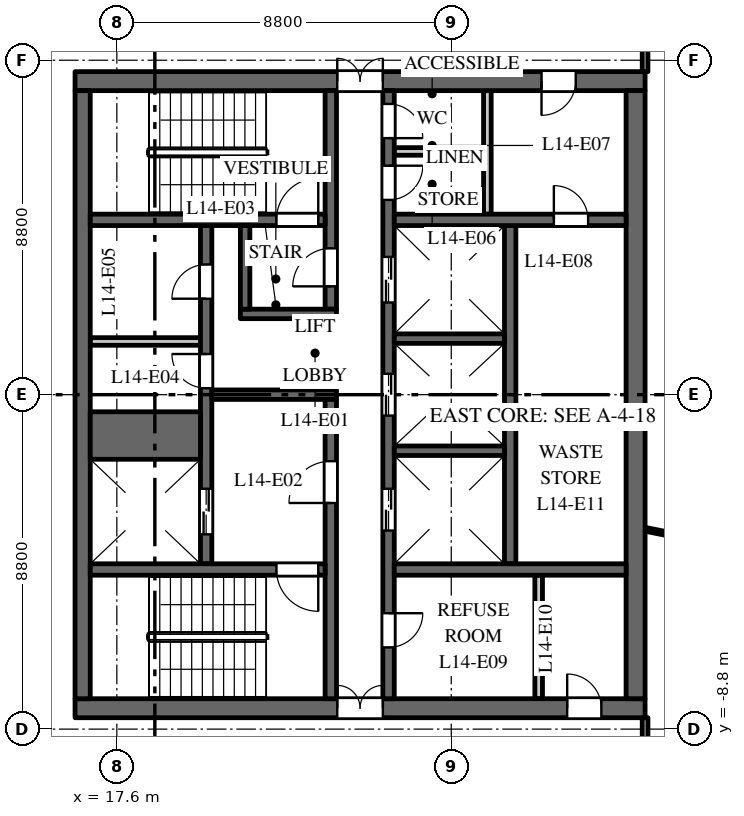
"""IFC4 building model, lengths in metres.
Left out: names, types, materials, properties, quantities, classifications, styles, units other than length and angle.
Written with IfcOpenShell. Run it as: python <this file> out.ifc"""

import sys

from ifc_helpers import new_model, si_unit, direction, frame, frame_2d, origin, place, context, subcontext, project, spatial, rectangle, extrude, element, fill, save


model = new_model("IFC4")
c1 = context("Model", 3, precision=1e-05, world=origin(), true_north=direction((0.0, 1.0)))
c2 = subcontext(c1, "Body", "Model", "MODEL_VIEW")
j1 = project(units=[si_unit("LENGTHUNIT", "METRE"), si_unit("PLANEANGLEUNIT", "RADIAN")], contexts=[c1])
p1 = place(None, origin())
s1 = spatial("IfcSite", under=j1, at=p1, CompositionType="ELEMENT")
p2 = place(p1, origin())
s2 = spatial("IfcBuilding", under=s1, at=p2, CompositionType="ELEMENT")
p3 = place(p2, frame((0.0, 0.0, 66.5)))
s3 = spatial("IfcBuildingStorey", under=s2, at=p3, CompositionType="ELEMENT", Elevation=66.5)
p4 = place(p3, frame((16.5, 8.25, 0.0), z_axis=(0.0, 0.0, 1.0), x_axis=(1.0, 0.0, 0.0)))
e1 = element("IfcWall", 1, at=p4, inside=s3, PredefinedType="SHEAR", context=c2, shape_type="SweptSolid", body=[
    extrude(rectangle(XDim=15.0, YDim=0.5, at=frame_2d((7.5, 0.0))), origin(), (0.0, 0.0, 1.0), 3.7),
])
p5 = place(p4, frame((6.9, 0.0, 0.0)))
e2 = element("IfcOpeningElement", 2, at=p5, cuts=e1, PredefinedType="OPENING", context=c2, shape_type="SweptSolid", body=[
    extrude(rectangle(XDim=1.2, YDim=2.1, at=frame_2d((0.6, 1.05))), frame((0.0, 0.26, 0.0), z_axis=(0.0, -1.0, 0.0), x_axis=(1.0, 0.0, 0.0)), (0.0, 0.0, 1.0), 0.52),
])
p6 = place(p4, frame((12.275, 0.0, 0.0)))
e3 = element("IfcOpeningElement", 3, at=p6, cuts=e1, PredefinedType="OPENING", context=c2, shape_type="SweptSolid", body=[
    extrude(rectangle(XDim=0.9, YDim=2.1, at=frame_2d((0.45, 1.05))), frame((0.0, 0.26, 0.0), z_axis=(0.0, -1.0, 0.0), x_axis=(1.0, 0.0, 0.0)), (0.0, 0.0, 1.0), 0.52),
])
p7 = place(p3, frame((16.5, -8.25, 0.0), z_axis=(0.0, 0.0, 1.0), x_axis=(1.0, 0.0, 0.0)))
e4 = element("IfcWall", 4, at=p7, inside=s3, PredefinedType="SHEAR", context=c2, shape_type="SweptSolid", body=[
    extrude(rectangle(XDim=15.0, YDim=0.5, at=frame_2d((7.5, 0.0))), origin(), (0.0, 0.0, 1.0), 3.7),
])
p8 = place(p7, frame((6.9, 0.0, 0.0)))
e5 = element("IfcOpeningElement", 5, at=p8, cuts=e4, PredefinedType="OPENING", context=c2, shape_type="SweptSolid", body=[
    extrude(rectangle(XDim=1.2, YDim=2.1, at=frame_2d((0.6, 1.05))), frame((0.0, 0.26, 0.0), z_axis=(0.0, -1.0, 0.0), x_axis=(1.0, 0.0, 0.0)), (0.0, 0.0, 1.0), 0.52),
])
p9 = place(p7, frame((12.95, 0.0, 0.0)))
e6 = element("IfcOpeningElement", 6, at=p9, cuts=e4, PredefinedType="OPENING", context=c2, shape_type="SweptSolid", body=[
    extrude(rectangle(XDim=0.9, YDim=2.1, at=frame_2d((0.45, 1.05))), frame((0.0, 0.26, 0.0), z_axis=(0.0, -1.0, 0.0), x_axis=(1.0, 0.0, 0.0)), (0.0, 0.0, 1.0), 0.52),
])
p10 = place(p3, frame((16.9, 1.4, 0.0), z_axis=(0.0, 0.0, 1.0), x_axis=(1.0, 0.0, 0.0)))
e7 = element("IfcWall", 7, at=p10, inside=s3, PredefinedType="PARTITIONING", context=c2, shape_type="SweptSolid", body=[
    extrude(rectangle(XDim=2.9, YDim=0.2, at=frame_2d((1.45, 0.0))), origin(), (0.0, 0.0, 1.0), 3.7),
])
p11 = place(p3, frame((27.95, -4.45, 0.0), z_axis=(0.0, 0.0, 1.0), x_axis=(0.0, 1.0, 0.0)))
e8 = element("IfcWall", 8, at=p11, inside=s3, PredefinedType="SHEAR", context=c2, shape_type="SweptSolid", body=[
    extrude(rectangle(XDim=8.9, YDim=0.3, at=frame_2d((4.45, 0.0))), origin(), (0.0, 0.0, 1.0), 3.7),
])
p12 = place(p3, frame((19.95, -4.45, 0.0), z_axis=(0.0, 0.0, 1.0), x_axis=(0.0, 1.0, 0.0)))
e9 = element("IfcWall", 9, at=p12, inside=s3, PredefinedType="SHEAR", context=c2, shape_type="SweptSolid", body=[
    extrude(rectangle(XDim=8.9, YDim=0.3, at=frame_2d((4.45, 0.0))), origin(), (0.0, 0.0, 1.0), 3.7),
])
p13 = place(p12, frame((0.775, 0.0, 0.0)))
e10 = element("IfcOpeningElement", 10, at=p13, cuts=e9, PredefinedType="OPENING", context=c2, shape_type="SweptSolid", body=[
    extrude(rectangle(XDim=1.2, YDim=2.1, at=frame_2d((0.6, 1.05))), frame((0.0, 0.16, 0.0), z_axis=(0.0, -1.0, 0.0), x_axis=(1.0, 0.0, 0.0)), (0.0, 0.0, 1.0), 0.32),
])
p14 = place(p12, frame((4.62, 0.0, 0.0)))
e11 = element("IfcOpeningElement", 11, at=p14, cuts=e9, PredefinedType="OPENING", context=c2, shape_type="SweptSolid", body=[
    extrude(rectangle(XDim=0.9, YDim=2.1, at=frame_2d((0.45, 1.05))), frame((0.0, 0.16, 0.0), z_axis=(0.0, -1.0, 0.0), x_axis=(1.0, 0.0, 0.0)), (0.0, 0.0, 1.0), 0.32),
])
p15 = place(p12, frame((6.975, 0.0, 0.0)))
e12 = element("IfcOpeningElement", 12, at=p15, cuts=e9, PredefinedType="OPENING", context=c2, shape_type="SweptSolid", body=[
    extrude(rectangle(XDim=0.9, YDim=2.1, at=frame_2d((0.45, 1.05))), frame((0.0, 0.16, 0.0), z_axis=(0.0, -1.0, 0.0), x_axis=(1.0, 0.0, 0.0)), (0.0, 0.0, 1.0), 0.32),
])
p16 = place(p3, frame((24.75, -8.0, 0.0), z_axis=(0.0, 0.0, 1.0), x_axis=(0.0, 1.0, 0.0)))
e13 = element("IfcWall", 13, at=p16, inside=s3, PredefinedType="SHEAR", context=c2, shape_type="SweptSolid", body=[
    extrude(rectangle(XDim=16.0, YDim=0.3, at=frame_2d((8.0, 0.0))), origin(), (0.0, 0.0, 1.0), 3.7),
])
p17 = place(p16, frame((4.425, 0.0, 0.0)))
e14 = element("IfcOpeningElement", 14, at=p17, cuts=e13, PredefinedType="OPENING", context=c2, shape_type="SweptSolid", body=[
    extrude(rectangle(XDim=1.1, YDim=2.1, at=frame_2d((0.55, 1.05))), frame((0.0, 0.16, 0.0), z_axis=(0.0, -1.0, 0.0), x_axis=(1.0, 0.0, 0.0)), (0.0, 0.0, 1.0), 0.32),
])
p18 = place(p16, frame((7.45, 0.0, 0.0)))
e15 = element("IfcOpeningElement", 15, at=p18, cuts=e13, PredefinedType="OPENING", context=c2, shape_type="SweptSolid", body=[
    extrude(rectangle(XDim=1.1, YDim=2.1, at=frame_2d((0.55, 1.05))), frame((0.0, 0.16, 0.0), z_axis=(0.0, -1.0, 0.0), x_axis=(1.0, 0.0, 0.0)), (0.0, 0.0, 1.0), 0.32),
])
p19 = place(p16, frame((10.425, 0.0, 0.0)))
e16 = element("IfcOpeningElement", 16, at=p19, cuts=e13, PredefinedType="OPENING", context=c2, shape_type="SweptSolid", body=[
    extrude(rectangle(XDim=1.2, YDim=2.1, at=frame_2d((0.6, 1.05))), frame((0.0, 0.16, 0.0), z_axis=(0.0, -1.0, 0.0), x_axis=(1.0, 0.0, 0.0)), (0.0, 0.0, 1.0), 0.32),
])
p20 = place(p16, frame((13.125, 0.0, 0.0)))
e17 = element("IfcOpeningElement", 17, at=p20, cuts=e13, PredefinedType="OPENING", context=c2, shape_type="SweptSolid", body=[
    extrude(rectangle(XDim=0.9, YDim=2.1, at=frame_2d((0.45, 1.05))), frame((0.0, 0.16, 0.0), z_axis=(0.0, -1.0, 0.0), x_axis=(1.0, 0.0, 0.0)), (0.0, 0.0, 1.0), 0.32),
])
p21 = place(p16, frame((14.75, 0.0, 0.0)))
e18 = element("IfcOpeningElement", 18, at=p21, cuts=e13, PredefinedType="OPENING", context=c2, shape_type="SweptSolid", body=[
    extrude(rectangle(XDim=0.9, YDim=2.1, at=frame_2d((0.45, 1.05))), frame((0.0, 0.16, 0.0), z_axis=(0.0, -1.0, 0.0), x_axis=(1.0, 0.0, 0.0)), (0.0, 0.0, 1.0), 0.32),
])
p22 = place(p16, frame((1.35, 0.0, 0.0)))
e19 = element("IfcOpeningElement", 19, at=p22, cuts=e13, PredefinedType="OPENING", context=c2, shape_type="SweptSolid", body=[
    extrude(rectangle(XDim=0.9, YDim=2.1, at=frame_2d((0.45, 1.05))), frame((0.0, 0.16, 0.0), z_axis=(0.0, -1.0, 0.0), x_axis=(1.0, 0.0, 0.0)), (0.0, 0.0, 1.0), 0.32),
])
p23 = place(p3, frame((20.1, 0.0, 0.0), z_axis=(0.0, 0.0, 1.0), x_axis=(1.0, 0.0, 0.0)))
e20 = element("IfcWall", 20, at=p23, inside=s3, PredefinedType="SHEAR", context=c2, shape_type="SweptSolid", body=[
    extrude(rectangle(XDim=3.28, YDim=0.25, at=frame_2d((1.64, 0.0))), origin(), (0.0, 0.0, 1.0), 3.7),
])
p24 = place(p3, frame((16.7, -8.0, 0.0), z_axis=(0.0, 0.0, 1.0), x_axis=(0.0, 1.0, 0.0)))
e21 = element("IfcWall", 21, at=p24, inside=s3, PredefinedType="SHEAR", context=c2, shape_type="SweptSolid", body=[
    extrude(rectangle(XDim=16.0, YDim=0.4, at=frame_2d((8.0, 0.0))), origin(), (0.0, 0.0, 1.0), 3.7),
])
p25 = place(p3, frame((31.25, -8.0, 0.0), z_axis=(0.0, 0.0, 1.0), x_axis=(0.0, 1.0, 0.0)))
e22 = element("IfcWall", 22, at=p25, inside=s3, PredefinedType="SHEAR", context=c2, shape_type="SweptSolid", body=[
    extrude(rectangle(XDim=16.0, YDim=0.5, at=frame_2d((8.0, 0.0))), origin(), (0.0, 0.0, 1.0), 3.7),
])
p26 = place(p3, frame((24.9, 4.6, 0.0), z_axis=(0.0, 0.0, 1.0), x_axis=(1.0, 0.0, 0.0)))
e23 = element("IfcWall", 23, at=p26, inside=s3, PredefinedType="SHEAR", context=c2, shape_type="SweptSolid", body=[
    extrude(rectangle(XDim=6.1, YDim=0.3, at=frame_2d((3.05, 0.0))), origin(), (0.0, 0.0, 1.0), 3.7),
])
p27 = place(p26, frame((4.2, 0.0, 0.0)))
e24 = element("IfcOpeningElement", 24, at=p27, cuts=e23, PredefinedType="OPENING", context=c2, shape_type="SweptSolid", body=[
    extrude(rectangle(XDim=0.9, YDim=2.1, at=frame_2d((0.45, 1.05))), frame((0.0, 0.16, 0.0), z_axis=(0.0, -1.0, 0.0), x_axis=(1.0, 0.0, 0.0)), (0.0, 0.0, 1.0), 0.32),
])
for number, where, z_axis, x_axis in (
    (25, (27.35, 4.75, 0.0), (0.0, 0.0, 1.0), (0.0, 1.0, 0.0)),
    (26, (28.7, -8.0, 0.0), (0.0, 0.0, 1.0), (0.0, 1.0, 0.0)),
):
    element("IfcWall", number, at=place(p3, frame(where, z_axis=z_axis, x_axis=x_axis)), inside=s3, PredefinedType="PARTITIONING", context=c2, shape_type="SweptSolid", body=[
        extrude(rectangle(XDim=3.25, YDim=0.2, at=frame_2d((1.625, 0.0))), origin(), (0.0, 0.0, 1.0), 3.7),
    ])
p28 = place(p3, frame((24.9, 6.4, 0.0), z_axis=(0.0, 0.0, 1.0), x_axis=(1.0, 0.0, 0.0)))
e27 = element("IfcWall", 27, at=p28, inside=s3, PredefinedType="PARTITIONING", context=c2, shape_type="SweptSolid", body=[
    extrude(rectangle(XDim=2.35, YDim=0.2, at=frame_2d((1.175, 0.0))), origin(), (0.0, 0.0, 1.0), 3.7),
])
p29 = place(p3, frame((24.9, -4.6, 0.0), z_axis=(0.0, 0.0, 1.0), x_axis=(1.0, 0.0, 0.0)))
e28 = element("IfcWall", 28, at=p29, inside=s3, PredefinedType="SHEAR", context=c2, shape_type="SweptSolid", body=[
    extrude(rectangle(XDim=6.1, YDim=0.3, at=frame_2d((3.05, 0.0))), origin(), (0.0, 0.0, 1.0), 3.7),
])
p30 = place(p3, frame((16.9, -1.075, 0.0), z_axis=(0.0, 0.0, 1.0), x_axis=(1.0, 0.0, 0.0)))
e29 = element("IfcWall", 29, at=p30, inside=s3, PredefinedType="SHEAR", context=c2, shape_type="SweptSolid", body=[
    extrude(rectangle(XDim=2.9, YDim=1.25, at=frame_2d((1.45, 0.0))), origin(), (0.0, 0.0, 1.0), 3.7),
])
for number, where, z_axis, x_axis in (
    (30, (24.9, -1.475, 0.0), (0.0, 0.0, 1.0), (1.0, 0.0, 0.0)),
    (31, (24.9, 1.475, 0.0), (0.0, 0.0, 1.0), (1.0, 0.0, 0.0)),
):
    element("IfcWall", number, at=place(p3, frame(where, z_axis=z_axis, x_axis=x_axis)), inside=s3, PredefinedType="SHEAR", context=c2, shape_type="SweptSolid", body=[
        extrude(rectangle(XDim=2.9, YDim=0.25, at=frame_2d((1.45, 0.0))), origin(), (0.0, 0.0, 1.0), 3.7),
    ])
p31 = place(p3, frame((23.23, 2.25, 0.0), z_axis=(0.0, 0.0, 1.0), x_axis=(0.0, 1.0, 0.0)))
e32 = element("IfcWall", 32, at=p31, inside=s3, PredefinedType="SHEAR", context=c2, shape_type="SweptSolid", body=[
    extrude(rectangle(XDim=5.75, YDim=0.3, at=frame_2d((2.875, 0.0))), origin(), (0.0, 0.0, 1.0), 3.7),
])
p32 = place(p31, frame((0.6, 0.0, 0.0)))
e33 = element("IfcOpeningElement", 33, at=p32, cuts=e32, PredefinedType="OPENING", context=c2, shape_type="SweptSolid", body=[
    extrude(rectangle(XDim=1.0, YDim=2.1, at=frame_2d((0.5, 1.05))), frame((0.0, 0.16, 0.0), z_axis=(0.0, -1.0, 0.0), x_axis=(1.0, 0.0, 0.0)), (0.0, 0.0, 1.0), 0.32),
])
p33 = place(p3, frame((23.23, -8.0, 0.0), z_axis=(0.0, 0.0, 1.0), x_axis=(0.0, 1.0, 0.0)))
e34 = element("IfcWall", 34, at=p33, inside=s3, PredefinedType="SHEAR", context=c2, shape_type="SweptSolid", body=[
    extrude(rectangle(XDim=7.875, YDim=0.3, at=frame_2d((3.938, 0.0))), origin(), (0.0, 0.0, 1.0), 3.7),
])
p34 = place(p33, frame((5.15, 0.0, 0.0)))
e35 = element("IfcOpeningElement", 35, at=p34, cuts=e34, PredefinedType="OPENING", context=c2, shape_type="SweptSolid", body=[
    extrude(rectangle(XDim=1.1, YDim=2.1, at=frame_2d((0.55, 1.05))), frame((0.0, 0.16, 0.0), z_axis=(0.0, -1.0, 0.0), x_axis=(1.0, 0.0, 0.0)), (0.0, 0.0, 1.0), 0.32),
])
p35 = place(p3, frame((16.9, 4.6, 0.0), z_axis=(0.0, 0.0, 1.0), x_axis=(1.0, 0.0, 0.0)))
e36 = element("IfcWall", 36, at=p35, inside=s3, PredefinedType="SHEAR", context=c2, shape_type="SweptSolid", body=[
    extrude(rectangle(XDim=6.18, YDim=0.3, at=frame_2d((3.09, 0.0))), origin(), (0.0, 0.0, 1.0), 3.7),
])
p36 = place(p35, frame((4.9, 0.0, 0.0)))
e37 = element("IfcOpeningElement", 37, at=p36, cuts=e36, PredefinedType="OPENING", context=c2, shape_type="SweptSolid", body=[
    extrude(rectangle(XDim=1.1, YDim=2.1, at=frame_2d((0.55, 1.05))), frame((0.0, 0.16, 0.0), z_axis=(0.0, -1.0, 0.0), x_axis=(1.0, 0.0, 0.0)), (0.0, 0.0, 1.0), 0.32),
])
p37 = place(p3, frame((16.9, -4.6, 0.0), z_axis=(0.0, 0.0, 1.0), x_axis=(1.0, 0.0, 0.0)))
e38 = element("IfcWall", 38, at=p37, inside=s3, PredefinedType="SHEAR", context=c2, shape_type="SweptSolid", body=[
    extrude(rectangle(XDim=6.18, YDim=0.3, at=frame_2d((3.09, 0.0))), origin(), (0.0, 0.0, 1.0), 3.7),
])
p38 = place(p37, frame((4.9, 0.0, 0.0)))
e39 = element("IfcOpeningElement", 39, at=p38, cuts=e38, PredefinedType="OPENING", context=c2, shape_type="SweptSolid", body=[
    extrude(rectangle(XDim=1.1, YDim=2.1, at=frame_2d((0.55, 1.05))), frame((0.0, 0.16, 0.0), z_axis=(0.0, -1.0, 0.0), x_axis=(1.0, 0.0, 0.0)), (0.0, 0.0, 1.0), 0.32),
])
p39 = place(p3, frame((20.85, 2.125, 0.0), z_axis=(0.0, 0.0, 1.0), x_axis=(1.0, 0.0, 0.0)))
e40 = element("IfcWall", 40, at=p39, inside=s3, PredefinedType="SHEAR", context=c2, shape_type="SweptSolid", body=[
    extrude(rectangle(XDim=2.53, YDim=0.25, at=frame_2d((1.265, 0.0))), origin(), (0.0, 0.0, 1.0), 3.7),
])
p40 = place(p3, frame((20.975, 2.25, 0.0), z_axis=(0.0, 0.0, 1.0), x_axis=(0.0, 1.0, 0.0)))
e41 = element("IfcWall", 41, at=p40, inside=s3, PredefinedType="SHEAR", context=c2, shape_type="SweptSolid", body=[
    extrude(rectangle(XDim=2.2, YDim=0.25, at=frame_2d((1.1, 0.0))), origin(), (0.0, 0.0, 1.0), 3.7),
])
p41 = place(p3, frame((31.5, -10.7, 0.0), z_axis=(0.0, 0.0, 1.0), x_axis=(0.0, 1.0, 0.0)))
e42 = element("IfcWall", 42, at=p41, inside=s3, PredefinedType="PARTITIONING", context=c2, shape_type="SweptSolid", body=[
    extrude(rectangle(XDim=2.2, YDim=0.15, at=frame_2d((1.1, 0.0))), origin(), (0.0, 0.0, 1.0), 2.85),
])
p42 = place(p41, frame((0.65, 0.0, 0.0)))
e43 = element("IfcOpeningElement", 43, at=p42, cuts=e42, PredefinedType="OPENING", context=c2, shape_type="SweptSolid", body=[
    extrude(rectangle(XDim=1.0, YDim=2.1, at=frame_2d((0.5, 1.05))), frame((0.0, 0.085, 0.0), z_axis=(0.0, -1.0, 0.0), x_axis=(1.0, 0.0, 0.0)), (0.0, 0.0, 1.0), 0.17),
])
p43 = place(p3, frame((31.5, -3.542, 0.0), z_axis=(0.0, 0.0, 1.0), x_axis=(0.980357474535, -0.197228857227, 0.0)))
e44 = element("IfcWall", 44, at=p43, inside=s3, PredefinedType="PARTITIONING", context=c2, shape_type="SweptSolid", body=[
    extrude(rectangle(XDim=4.092, YDim=0.1, at=frame_2d((2.046, 0.0))), origin(), (0.0, 0.0, 1.0), 2.85),
])
p44 = place(p3, frame((31.5, 8.5, 0.0), z_axis=(0.0, 0.0, 1.0), x_axis=(0.0, 1.0, 0.0)))
e45 = element("IfcWall", 45, at=p44, inside=s3, PredefinedType="PARTITIONING", context=c2, shape_type="SweptSolid", body=[
    extrude(rectangle(XDim=2.2, YDim=0.15, at=frame_2d((1.1, 0.0))), origin(), (0.0, 0.0, 1.0), 2.85),
])
p45 = place(p44, frame((0.65, 0.0, 0.0)))
e46 = element("IfcOpeningElement", 46, at=p45, cuts=e45, PredefinedType="OPENING", context=c2, shape_type="SweptSolid", body=[
    extrude(rectangle(XDim=1.0, YDim=2.1, at=frame_2d((0.5, 1.05))), frame((0.0, 0.085, 0.0), z_axis=(0.0, -1.0, 0.0), x_axis=(1.0, 0.0, 0.0)), (0.0, 0.0, 1.0), 0.17),
])
p46 = place(p13, origin())
e47 = element("IfcDoor", 47, at=p46, inside=s3, OperationType="DOUBLE_DOOR_SLIDING", PredefinedType="DOOR", context=c2, shape_type="SweptSolid", body=[
    extrude(rectangle(XDim=1.2, YDim=2.1, at=frame_2d((0.6, 1.05))), frame((0.0, 0.025, 0.0), z_axis=(0.0, -1.0, 0.0), x_axis=(1.0, 0.0, 0.0)), (0.0, 0.0, 1.0), 0.05),
])
fill(e10, e47)
p47 = place(p17, origin())
e48 = element("IfcDoor", 48, at=p47, inside=s3, OperationType="DOUBLE_DOOR_SLIDING", PredefinedType="DOOR", context=c2, shape_type="SweptSolid", body=[
    extrude(rectangle(XDim=1.1, YDim=2.1, at=frame_2d((0.55, 1.05))), frame((0.0, 0.025, 0.0), z_axis=(0.0, -1.0, 0.0), x_axis=(1.0, 0.0, 0.0)), (0.0, 0.0, 1.0), 0.05),
])
fill(e14, e48)
p48 = place(p18, origin())
e49 = element("IfcDoor", 49, at=p48, inside=s3, OperationType="DOUBLE_DOOR_SLIDING", PredefinedType="DOOR", context=c2, shape_type="SweptSolid", body=[
    extrude(rectangle(XDim=1.1, YDim=2.1, at=frame_2d((0.55, 1.05))), frame((0.0, 0.025, 0.0), z_axis=(0.0, -1.0, 0.0), x_axis=(1.0, 0.0, 0.0)), (0.0, 0.0, 1.0), 0.05),
])
fill(e15, e49)
p49 = place(p19, origin())
e50 = element("IfcDoor", 50, at=p49, inside=s3, OperationType="DOUBLE_DOOR_SLIDING", PredefinedType="DOOR", context=c2, shape_type="SweptSolid", body=[
    extrude(rectangle(XDim=1.2, YDim=2.1, at=frame_2d((0.6, 1.05))), frame((0.0, 0.025, 0.0), z_axis=(0.0, -1.0, 0.0), x_axis=(1.0, 0.0, 0.0)), (0.0, 0.0, 1.0), 0.05),
])
fill(e16, e50)
p50 = place(p36, origin())
e51 = element("IfcDoor", 51, at=p50, inside=s3, OperationType="SINGLE_SWING_LEFT", PredefinedType="DOOR", context=c2, shape_type="SweptSolid", body=[
    extrude(rectangle(XDim=1.1, YDim=2.1, at=frame_2d((0.55, 1.05))), frame((0.0, 0.025, 0.0), z_axis=(0.0, -1.0, 0.0), x_axis=(1.0, 0.0, 0.0)), (0.0, 0.0, 1.0), 0.05),
])
fill(e37, e51)
p51 = place(p38, origin())
e52 = element("IfcDoor", 52, at=p51, inside=s3, OperationType="SINGLE_SWING_RIGHT", PredefinedType="DOOR", context=c2, shape_type="SweptSolid", body=[
    extrude(rectangle(XDim=1.1, YDim=2.1, at=frame_2d((0.55, 1.05))), frame((0.0, 0.025, 0.0), z_axis=(0.0, -1.0, 0.0), x_axis=(1.0, 0.0, 0.0)), (0.0, 0.0, 1.0), 0.05),
])
fill(e39, e52)
p52 = place(p34, origin())
e53 = element("IfcDoor", 53, at=p52, inside=s3, OperationType="SINGLE_SWING_RIGHT", PredefinedType="DOOR", context=c2, shape_type="SweptSolid", body=[
    extrude(rectangle(XDim=1.1, YDim=2.1, at=frame_2d((0.55, 1.05))), frame((0.0, 0.025, 0.0), z_axis=(0.0, -1.0, 0.0), x_axis=(1.0, 0.0, 0.0)), (0.0, 0.0, 1.0), 0.05),
])
fill(e35, e53)
p53 = place(p32, origin())
e54 = element("IfcDoor", 54, at=p53, inside=s3, OperationType="SINGLE_SWING_RIGHT", PredefinedType="DOOR", context=c2, shape_type="SweptSolid", body=[
    extrude(rectangle(XDim=1.0, YDim=2.1, at=frame_2d((0.5, 1.05))), frame((0.0, 0.025, 0.0), z_axis=(0.0, -1.0, 0.0), x_axis=(1.0, 0.0, 0.0)), (0.0, 0.0, 1.0), 0.05),
])
fill(e33, e54)
p54 = place(p5, origin())
e55 = element("IfcDoor", 55, at=p54, inside=s3, OperationType="DOUBLE_DOOR_DOUBLE_SWING", PredefinedType="DOOR", context=c2, shape_type="SweptSolid", body=[
    extrude(rectangle(XDim=1.2, YDim=2.1, at=frame_2d((0.6, 1.05))), frame((0.0, 0.025, 0.0), z_axis=(0.0, -1.0, 0.0), x_axis=(1.0, 0.0, 0.0)), (0.0, 0.0, 1.0), 0.05),
])
fill(e2, e55)
p55 = place(p8, origin())
e56 = element("IfcDoor", 56, at=p55, inside=s3, OperationType="DOUBLE_DOOR_DOUBLE_SWING", PredefinedType="DOOR", context=c2, shape_type="SweptSolid", body=[
    extrude(rectangle(XDim=1.2, YDim=2.1, at=frame_2d((0.6, 1.05))), frame((0.0, 0.025, 0.0), z_axis=(0.0, -1.0, 0.0), x_axis=(1.0, 0.0, 0.0)), (0.0, 0.0, 1.0), 0.05),
])
fill(e5, e56)
p56 = place(p14, origin())
e57 = element("IfcDoor", 57, at=p56, inside=s3, OperationType="SINGLE_SWING_LEFT", PredefinedType="DOOR", context=c2, shape_type="SweptSolid", body=[
    extrude(rectangle(XDim=0.9, YDim=2.1, at=frame_2d((0.45, 1.05))), frame((0.0, 0.025, 0.0), z_axis=(0.0, -1.0, 0.0), x_axis=(1.0, 0.0, 0.0)), (0.0, 0.0, 1.0), 0.05),
])
fill(e11, e57)
p57 = place(p15, origin())
e58 = element("IfcDoor", 58, at=p57, inside=s3, OperationType="SINGLE_SWING_RIGHT", PredefinedType="DOOR", context=c2, shape_type="SweptSolid", body=[
    extrude(rectangle(XDim=0.9, YDim=2.1, at=frame_2d((0.45, 1.05))), frame((0.0, 0.025, 0.0), z_axis=(0.0, -1.0, 0.0), x_axis=(1.0, 0.0, 0.0)), (0.0, 0.0, 1.0), 0.05),
])
fill(e12, e58)
p58 = place(p20, origin())
e59 = element("IfcDoor", 59, at=p58, inside=s3, OperationType="SINGLE_SWING_RIGHT", PredefinedType="DOOR", context=c2, shape_type="SweptSolid", body=[
    extrude(rectangle(XDim=0.9, YDim=2.1, at=frame_2d((0.45, 1.05))), frame((0.0, 0.025, 0.0), z_axis=(0.0, -1.0, 0.0), x_axis=(1.0, 0.0, 0.0)), (0.0, 0.0, 1.0), 0.05),
])
fill(e17, e59)
p59 = place(p21, origin())
e60 = element("IfcDoor", 60, at=p59, inside=s3, OperationType="SINGLE_SWING_LEFT", PredefinedType="DOOR", context=c2, shape_type="SweptSolid", body=[
    extrude(rectangle(XDim=0.9, YDim=2.1, at=frame_2d((0.45, 1.05))), frame((0.0, 0.025, 0.0), z_axis=(0.0, -1.0, 0.0), x_axis=(1.0, 0.0, 0.0)), (0.0, 0.0, 1.0), 0.05),
])
fill(e18, e60)
p60 = place(p6, origin())
e61 = element("IfcDoor", 61, at=p60, inside=s3, OperationType="SINGLE_SWING_LEFT", PredefinedType="DOOR", context=c2, shape_type="SweptSolid", body=[
    extrude(rectangle(XDim=0.9, YDim=2.1, at=frame_2d((0.45, 1.05))), frame((0.0, 0.025, 0.0), z_axis=(0.0, -1.0, 0.0), x_axis=(1.0, 0.0, 0.0)), (0.0, 0.0, 1.0), 0.05),
])
fill(e3, e61)
p61 = place(p22, origin())
e62 = element("IfcDoor", 62, at=p61, inside=s3, OperationType="SINGLE_SWING_RIGHT", PredefinedType="DOOR", context=c2, shape_type="SweptSolid", body=[
    extrude(rectangle(XDim=0.9, YDim=2.1, at=frame_2d((0.45, 1.05))), frame((0.0, 0.025, 0.0), z_axis=(0.0, -1.0, 0.0), x_axis=(1.0, 0.0, 0.0)), (0.0, 0.0, 1.0), 0.05),
])
fill(e19, e62)
p62 = place(p9, origin())
e63 = element("IfcDoor", 63, at=p62, inside=s3, OperationType="SINGLE_SWING_RIGHT", PredefinedType="DOOR", context=c2, shape_type="SweptSolid", body=[
    extrude(rectangle(XDim=0.9, YDim=2.1, at=frame_2d((0.45, 1.05))), frame((0.0, 0.025, 0.0), z_axis=(0.0, -1.0, 0.0), x_axis=(1.0, 0.0, 0.0)), (0.0, 0.0, 1.0), 0.05),
])
fill(e6, e63)
p63 = place(p27, origin())
e64 = element("IfcDoor", 64, at=p63, inside=s3, OperationType="SINGLE_SWING_RIGHT", PredefinedType="DOOR", context=c2, shape_type="SweptSolid", body=[
    extrude(rectangle(XDim=0.9, YDim=2.1, at=frame_2d((0.45, 1.05))), frame((0.0, 0.025, 0.0), z_axis=(0.0, -1.0, 0.0), x_axis=(1.0, 0.0, 0.0)), (0.0, 0.0, 1.0), 0.05),
])
fill(e24, e64)
save(model, sys.argv[1])
